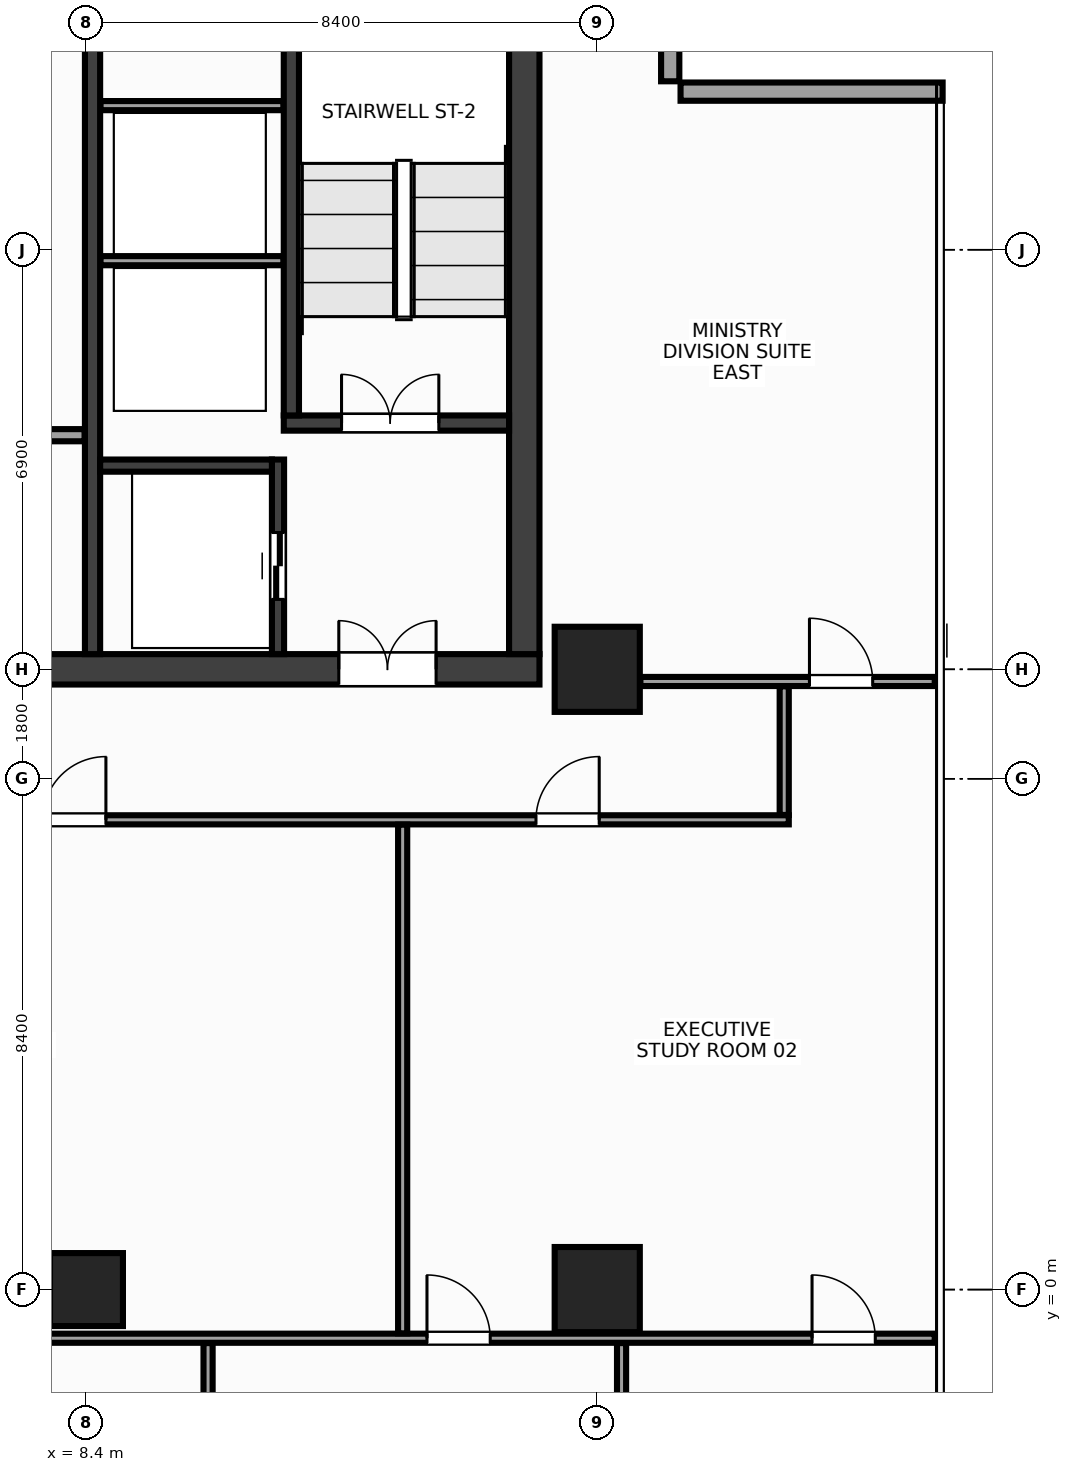
"""IFC4 building model, lengths in metres.
Left out: names, types, materials, properties, quantities, classifications, styles, units other than length and angle.
Written with IfcOpenShell. Run it as: python <this file> out.ifc"""

import sys

from ifc_helpers import new_model, si_unit, direction, frame, frame_2d, origin, origin_2d, place, context, subcontext, project, spatial, rectangle, extrude, source, transform, mapped, element, fill, save


model = new_model("IFC4")
c1 = context("Model", 3, precision=1e-05, world=origin(), true_north=direction((0.0, 1.0)))
c2 = subcontext(c1, "Body", "Model", "MODEL_VIEW")
j1 = project(units=[si_unit("LENGTHUNIT", "METRE"), si_unit("PLANEANGLEUNIT", "RADIAN")], contexts=[c1])
p1 = place(None, origin())
s1 = spatial("IfcSite", under=j1, at=p1, CompositionType="ELEMENT")
p2 = place(p1, origin())
s2 = spatial("IfcBuilding", under=s1, at=p2, CompositionType="ELEMENT")
p3 = place(p2, frame((0.0, 0.0, 246.8)))
s3 = spatial("IfcBuildingStorey", under=s2, at=p3, CompositionType="ELEMENT", Elevation=246.8)
m1 = source(origin(), c2, "Body", "SweptSolid", [
    extrude(rectangle(XDim=31.7, YDim=0.5, at=frame_2d((15.85, 0.0))), origin(), (0.0, 0.0, 1.0), 3.6),
])
p4 = place(p3, frame((-15.85, 10.2, 0.0), z_axis=(0.0, 0.0, 1.0), x_axis=(1.0, 0.0, 0.0)))
e1 = element("IfcWall", 1, at=p4, inside=s3, PredefinedType="SHEAR", context=c2, shape_type="MappedRepresentation", body=[
    mapped(m1, transform((0.0, 0.0, 0.0), x_axis=(1.0, 0.0, 0.0), y_axis=(0.0, 1.0, 0.0), z_axis=(0.0, 0.0, 1.0), scale=1.0)),
])
p5 = place(p4, frame((1.7, 0.0, 0.0)))
e2 = element("IfcOpeningElement", 2, at=p5, cuts=e1, PredefinedType="OPENING", context=c2, shape_type="SweptSolid", body=[
    extrude(rectangle(XDim=1.6, YDim=2.15, at=frame_2d((0.8, 1.075))), frame((0.0, 0.262, 0.0), z_axis=(0.0, -1.0, 0.0), x_axis=(1.0, 0.0, 0.0)), (0.0, 0.0, 1.0), 0.524),
])
p6 = place(p4, frame((28.4, 0.0, 0.0)))
e3 = element("IfcOpeningElement", 3, at=p6, cuts=e1, PredefinedType="OPENING", context=c2, shape_type="SweptSolid", body=[
    extrude(rectangle(XDim=1.6, YDim=2.15, at=frame_2d((0.8, 1.075))), frame((0.0, 0.262, 0.0), z_axis=(0.0, -1.0, 0.0), x_axis=(1.0, 0.0, 0.0)), (0.0, 0.0, 1.0), 0.524),
])
p7 = place(p4, frame((15.1, 0.0, 0.0)))
e4 = element("IfcOpeningElement", 4, at=p7, cuts=e1, PredefinedType="OPENING", context=c2, shape_type="SweptSolid", body=[
    extrude(rectangle(XDim=1.5, YDim=2.2, at=frame_2d((0.75, 1.1))), frame((0.0, 0.262, 0.0), z_axis=(0.0, -1.0, 0.0), x_axis=(1.0, 0.0, 0.0)), (0.0, 0.0, 1.0), 0.524),
])
m2 = source(origin(), c2, "Body", "SweptSolid", [
    extrude(rectangle(XDim=13.1, YDim=0.5, at=frame_2d((6.55, 0.0))), origin(), (0.0, 0.0, 1.0), 3.6),
])
p8 = place(p3, frame((15.6, 10.45, 0.0), z_axis=(0.0, 0.0, 1.0), x_axis=(0.0, 1.0, 0.0)))
e5 = element("IfcWall", 5, at=p8, inside=s3, PredefinedType="SHEAR", context=c2, shape_type="MappedRepresentation", body=[
    mapped(m2, transform((0.0, 0.0, 0.0), x_axis=(1.0, 0.0, 0.0), y_axis=(0.0, 1.0, 0.0), z_axis=(0.0, 0.0, 1.0), scale=1.0)),
])
m3 = source(origin(), c2, "Body", "SweptSolid", [
    extrude(rectangle(XDim=13.1, YDim=0.25, at=frame_2d((6.55, 0.0))), origin(), (0.0, 0.0, 1.0), 3.6),
])
p9 = place(p3, frame((8.5, 10.45, 0.0), z_axis=(0.0, 0.0, 1.0), x_axis=(0.0, 1.0, 0.0)))
e6 = element("IfcWall", 6, at=p9, inside=s3, PredefinedType="SHEAR", context=c2, shape_type="MappedRepresentation", body=[
    mapped(m3, transform((0.0, 0.0, 0.0), x_axis=(1.0, 0.0, 0.0), y_axis=(0.0, 1.0, 0.0), z_axis=(0.0, 0.0, 1.0), scale=1.0)),
])
p10 = place(p9, frame((10.0, 0.0, 0.0)))
e7 = element("IfcOpeningElement", 7, at=p10, cuts=e6, PredefinedType="OPENING", context=c2, shape_type="SweptSolid", body=[
    extrude(rectangle(XDim=0.95, YDim=2.15, at=frame_2d((0.475, 1.075))), frame((0.0, 0.137, 0.0), z_axis=(0.0, -1.0, 0.0), x_axis=(1.0, 0.0, 0.0)), (0.0, 0.0, 1.0), 0.274),
])
m4 = source(origin(), c2, "Body", "SweptSolid", [
    extrude(rectangle(XDim=3.705, YDim=0.25, at=frame_2d((1.853, 0.0))), origin(), (0.0, 0.0, 1.0), 3.6),
])
p11 = place(p3, frame((11.645, 14.25, 0.0), z_axis=(0.0, 0.0, 1.0), x_axis=(1.0, 0.0, 0.0)))
e8 = element("IfcWall", 8, at=p11, inside=s3, PredefinedType="SHEAR", context=c2, shape_type="MappedRepresentation", body=[
    mapped(m4, transform((0.0, 0.0, 0.0), x_axis=(1.0, 0.0, 0.0), y_axis=(0.0, 1.0, 0.0), z_axis=(0.0, 0.0, 1.0), scale=1.0)),
])
p12 = place(p11, frame((0.95, 0.0, 0.0)))
e9 = element("IfcOpeningElement", 9, at=p12, cuts=e8, PredefinedType="OPENING", context=c2, shape_type="SweptSolid", body=[
    extrude(rectangle(XDim=1.6, YDim=2.15, at=frame_2d((0.8, 1.075))), frame((0.0, 0.137, 0.0), z_axis=(0.0, -1.0, 0.0), x_axis=(1.0, 0.0, 0.0)), (0.0, 0.0, 1.0), 0.274),
])
m5 = source(origin(), c2, "Body", "SweptSolid", [
    extrude(rectangle(XDim=9.175, YDim=0.25, at=frame_2d((4.587, 0.0))), origin(), (0.0, 0.0, 1.0), 3.6),
])
p13 = place(p3, frame((11.77, 14.375, 0.0), z_axis=(0.0, 0.0, 1.0), x_axis=(0.0, 1.0, 0.0)))
e10 = element("IfcWall", 10, at=p13, inside=s3, PredefinedType="SHEAR", context=c2, shape_type="MappedRepresentation", body=[
    mapped(m5, transform((0.0, 0.0, 0.0), x_axis=(1.0, 0.0, 0.0), y_axis=(0.0, 1.0, 0.0), z_axis=(0.0, 0.0, 1.0), scale=1.0)),
])
m6 = source(origin(), c2, "Body", "SweptSolid", [
    extrude(rectangle(XDim=3.2, YDim=0.2, at=frame_2d((1.6, 0.0))), origin(), (0.0, 0.0, 1.0), 3.6),
])
p14 = place(p3, frame((11.55, 10.45, 0.0), z_axis=(0.0, 0.0, 1.0), x_axis=(0.0, 1.0, 0.0)))
e11 = element("IfcWall", 11, at=p14, inside=s3, PredefinedType="SHEAR", context=c2, shape_type="MappedRepresentation", body=[
    mapped(m6, transform((0.0, 0.0, 0.0), x_axis=(1.0, 0.0, 0.0), y_axis=(0.0, 1.0, 0.0), z_axis=(0.0, 0.0, 1.0), scale=1.0)),
])
p15 = place(p14, frame((0.9, 0.0, 0.0)))
e12 = element("IfcOpeningElement", 12, at=p15, cuts=e11, PredefinedType="OPENING", context=c2, shape_type="SweptSolid", body=[
    extrude(rectangle(XDim=1.1, YDim=2.15, at=frame_2d((0.55, 1.075))), frame((0.0, 0.112, 0.0), z_axis=(0.0, -1.0, 0.0), x_axis=(1.0, 0.0, 0.0)), (0.0, 0.0, 1.0), 0.224),
])
m7 = source(origin(), c2, "Body", "SweptSolid", [
    extrude(rectangle(XDim=2.825, YDim=0.2, at=frame_2d((1.413, 0.0))), origin(), (0.0, 0.0, 1.0), 3.6),
])
p16 = place(p3, frame((8.625, 13.55, 0.0), z_axis=(0.0, 0.0, 1.0), x_axis=(1.0, 0.0, 0.0)))
e13 = element("IfcWall", 13, at=p16, inside=s3, PredefinedType="SHEAR", context=c2, shape_type="MappedRepresentation", body=[
    mapped(m7, transform((0.0, 0.0, 0.0), x_axis=(1.0, 0.0, 0.0), y_axis=(0.0, 1.0, 0.0), z_axis=(0.0, 0.0, 1.0), scale=1.0)),
])
m8 = source(origin(), c2, "Body", "SweptSolid", [
    extrude(rectangle(XDim=1.4, YDim=1.4, at=origin_2d()), origin(), (0.0, 0.0, 1.0), 3.6),
])
for number, where, z_axis, x_axis in (
    (14, (16.8, 0.0, 0.0), (0.0, 0.0, 1.0), (1.0, 0.0, 0.0)),
    (15, (16.8, 10.2, 0.0), (0.0, 0.0, 1.0), (1.0, 0.0, 0.0)),
):
    element("IfcColumn", number, at=place(p3, frame(where, z_axis=z_axis, x_axis=x_axis)), inside=s3, PredefinedType="COLUMN", context=c2, shape_type="MappedRepresentation", body=[
        mapped(m8, transform((0.0, 0.0, 0.0), x_axis=(1.0, 0.0, 0.0), y_axis=(0.0, 1.0, 0.0), z_axis=(0.0, 0.0, 1.0), scale=1.0)),
    ])
m9 = source(origin(), c2, "Body", "SweptSolid", [
    extrude(rectangle(XDim=1.2, YDim=1.2, at=origin_2d()), origin(), (0.0, 0.0, 1.0), 3.6),
])
p17 = place(p3, frame((8.4, 0.0, 0.0), z_axis=(0.0, 0.0, 1.0), x_axis=(1.0, 0.0, 0.0)))
e16 = element("IfcColumn", 16, at=p17, inside=s3, PredefinedType="COLUMN", context=c2, shape_type="MappedRepresentation", body=[
    mapped(m9, transform((0.0, 0.0, 0.0), x_axis=(1.0, 0.0, 0.0), y_axis=(0.0, 1.0, 0.0), z_axis=(0.0, 0.0, 1.0), scale=1.0)),
])
m10 = source(origin(), c2, "Body", "SweptSolid", [
    extrude(rectangle(XDim=4.31, YDim=0.3, at=frame_2d((2.155, 0.0))), origin(), (0.0, 0.0, 1.0), 2.75),
])
p18 = place(p3, frame((22.48, 19.7, 0.0), z_axis=(0.0, 0.0, 1.0), x_axis=(-1.0, 0.0, 0.0)))
e17 = element("IfcWall", 17, at=p18, inside=s3, PredefinedType="STANDARD", context=c2, shape_type="MappedRepresentation", body=[
    mapped(m10, transform((0.0, 0.0, 0.0), x_axis=(1.0, 0.0, 0.0), y_axis=(0.0, 1.0, 0.0), z_axis=(0.0, 0.0, 1.0), scale=1.0)),
])
m11 = source(origin(), c2, "Body", "SweptSolid", [
    extrude(rectangle(XDim=4.31, YDim=0.3, at=frame_2d((2.155, 0.0))), origin(), (0.0, 0.0, 1.0), 2.75),
])
p19 = place(p3, frame((18.0, 19.87, 0.0), z_axis=(0.0, 0.0, 1.0), x_axis=(0.0, 1.0, 0.0)))
e18 = element("IfcWall", 18, at=p19, inside=s3, PredefinedType="STANDARD", context=c2, shape_type="MappedRepresentation", body=[
    mapped(m11, transform((0.0, 0.0, 0.0), x_axis=(1.0, 0.0, 0.0), y_axis=(0.0, 1.0, 0.0), z_axis=(0.0, 0.0, 1.0), scale=1.0)),
])
m12 = source(origin(), c2, "Body", "SweptSolid", [
    extrude(rectangle(XDim=3.01, YDim=0.15, at=frame_2d((1.505, 0.0))), origin(), (0.0, 0.0, 1.0), 3.37),
])
for number, where, z_axis, x_axis in (
    (19, (8.63, 16.92, 0.0), (0.0, 0.0, 1.0), (1.0, 0.0, 0.0)),
    (20, (8.63, 19.47, 0.0), (0.0, 0.0, 1.0), (1.0, 0.0, 0.0)),
):
    element("IfcWall", number, at=place(p3, frame(where, z_axis=z_axis, x_axis=x_axis)), inside=s3, PredefinedType="PARTITIONING", context=c2, shape_type="MappedRepresentation", body=[
        mapped(m12, transform((0.0, 0.0, 0.0), x_axis=(1.0, 0.0, 0.0), y_axis=(0.0, 1.0, 0.0), z_axis=(0.0, 0.0, 1.0), scale=1.0)),
    ])
m13 = source(origin(), c2, "Body", "SweptSolid", [
    extrude(rectangle(XDim=7.07, YDim=0.2, at=frame_2d((3.535, 0.0))), origin(), (0.0, 0.0, 1.0), 3.37),
])
p20 = place(p3, frame((1.3, 14.05, 0.0), z_axis=(0.0, 0.0, 1.0), x_axis=(1.0, 0.0, 0.0)))
e21 = element("IfcWall", 21, at=p20, inside=s3, PredefinedType="PARTITIONING", context=c2, shape_type="MappedRepresentation", body=[
    mapped(m13, transform((0.0, 0.0, 0.0), x_axis=(1.0, 0.0, 0.0), y_axis=(0.0, 1.0, 0.0), z_axis=(0.0, 0.0, 1.0), scale=1.0)),
])
p21 = place(p20, frame((1.16, 0.0, 0.0)))
e22 = element("IfcOpeningElement", 22, at=p21, cuts=e21, PredefinedType="OPENING", context=c2, shape_type="SweptSolid", body=[
    extrude(rectangle(XDim=0.9, YDim=2.15, at=frame_2d((0.45, 1.075))), frame((0.0, 0.112, 0.0), z_axis=(0.0, -1.0, 0.0), x_axis=(1.0, 0.0, 0.0)), (0.0, 0.0, 1.0), 0.224),
])
p22 = place(p20, frame((4.61, 0.0, 0.0)))
e23 = element("IfcOpeningElement", 23, at=p22, cuts=e21, PredefinedType="OPENING", context=c2, shape_type="SweptSolid", body=[
    extrude(rectangle(XDim=0.9, YDim=2.15, at=frame_2d((0.45, 1.075))), frame((0.0, 0.112, 0.0), z_axis=(0.0, -1.0, 0.0), x_axis=(1.0, 0.0, 0.0)), (0.0, 0.0, 1.0), 0.224),
])
m14 = source(origin(), c2, "Body", "SweptSolid", [
    extrude(rectangle(XDim=4.84, YDim=0.15, at=frame_2d((2.42, 0.0))), origin(), (0.0, 0.0, 1.0), 3.37),
])
p23 = place(p3, frame((17.51, 10.0, 0.0), z_axis=(0.0, 0.0, 1.0), x_axis=(1.0, 0.0, 0.0)))
e24 = element("IfcWall", 24, at=p23, inside=s3, PredefinedType="PARTITIONING", context=c2, shape_type="MappedRepresentation", body=[
    mapped(m14, transform((0.0, 0.0, 0.0), x_axis=(1.0, 0.0, 0.0), y_axis=(0.0, 1.0, 0.0), z_axis=(0.0, 0.0, 1.0), scale=1.0)),
])
p24 = place(p23, frame((2.78, 0.0, 0.0)))
e25 = element("IfcOpeningElement", 25, at=p24, cuts=e24, PredefinedType="OPENING", context=c2, shape_type="SweptSolid", body=[
    extrude(rectangle(XDim=1.04, YDim=2.2, at=frame_2d((0.52, 1.1))), frame((0.0, 0.087, 0.0), z_axis=(0.0, -1.0, 0.0), x_axis=(1.0, 0.0, 0.0)), (0.0, 0.0, 1.0), 0.174),
])
m15 = source(origin(), c2, "Body", "SweptSolid", [
    extrude(rectangle(XDim=21.9, YDim=0.15, at=frame_2d((10.95, 0.0))), origin(), (0.0, 0.0, 1.0), 2.755),
])
p25 = place(p3, frame((-1.95, 7.725, 0.0), z_axis=(0.0, 0.0, 1.0), x_axis=(1.0, 0.0, 0.0)))
e26 = element("IfcWall", 26, at=p25, inside=s3, PredefinedType="PARTITIONING", context=c2, shape_type="MappedRepresentation", body=[
    mapped(m15, transform((0.0, 0.0, 0.0), x_axis=(1.0, 0.0, 0.0), y_axis=(0.0, 1.0, 0.0), z_axis=(0.0, 0.0, 1.0), scale=1.0)),
])
p26 = place(p25, frame((17.742, 0.0, 0.0)))
e27 = element("IfcOpeningElement", 27, at=p26, cuts=e26, PredefinedType="OPENING", context=c2, shape_type="SweptSolid", body=[
    extrude(rectangle(XDim=1.04, YDim=2.2, at=frame_2d((0.52, 1.1))), frame((0.0, 0.087, 0.0), z_axis=(0.0, -1.0, 0.0), x_axis=(1.0, 0.0, 0.0)), (0.0, 0.0, 1.0), 0.174),
])
p27 = place(p25, frame((1.877, 0.0, 0.0)))
e28 = element("IfcOpeningElement", 28, at=p27, cuts=e26, PredefinedType="OPENING", context=c2, shape_type="SweptSolid", body=[
    extrude(rectangle(XDim=1.04, YDim=2.2, at=frame_2d((0.52, 1.1))), frame((0.0, 0.087, 0.0), z_axis=(0.0, -1.0, 0.0), x_axis=(1.0, 0.0, 0.0)), (0.0, 0.0, 1.0), 0.174),
])
p28 = place(p25, frame((9.63, 0.0, 0.0)))
e29 = element("IfcOpeningElement", 29, at=p28, cuts=e26, PredefinedType="OPENING", context=c2, shape_type="SweptSolid", body=[
    extrude(rectangle(XDim=1.04, YDim=2.2, at=frame_2d((0.52, 1.1))), frame((0.0, 0.087, 0.0), z_axis=(0.0, -1.0, 0.0), x_axis=(1.0, 0.0, 0.0)), (0.0, 0.0, 1.0), 0.174),
])
m16 = source(origin(), c2, "Body", "SweptSolid", [
    extrude(rectangle(XDim=2.115, YDim=0.15, at=frame_2d((1.058, 0.0))), origin(), (0.0, 0.0, 1.0), 3.37),
])
p29 = place(p3, frame((19.875, 7.805, 0.0), z_axis=(0.0, 0.0, 1.0), x_axis=(0.0, 1.0, 0.0)))
e30 = element("IfcWall", 30, at=p29, inside=s3, PredefinedType="PARTITIONING", context=c2, shape_type="MappedRepresentation", body=[
    mapped(m16, transform((0.0, 0.0, 0.0), x_axis=(1.0, 0.0, 0.0), y_axis=(0.0, 1.0, 0.0), z_axis=(0.0, 0.0, 1.0), scale=1.0)),
])
m17 = source(origin(), c2, "Body", "SweptSolid", [
    extrude(rectangle(XDim=24.295, YDim=0.15, at=frame_2d((12.147, 0.0))), origin(), (0.0, 0.0, 1.0), 2.755),
])
p30 = place(p3, frame((-1.945, -0.8, 0.0), z_axis=(0.0, 0.0, 1.0), x_axis=(1.0, 0.0, 0.0)))
e31 = element("IfcWall", 31, at=p30, inside=s3, PredefinedType="PARTITIONING", context=c2, shape_type="MappedRepresentation", body=[
    mapped(m17, transform((0.0, 0.0, 0.0), x_axis=(1.0, 0.0, 0.0), y_axis=(0.0, 1.0, 0.0), z_axis=(0.0, 0.0, 1.0), scale=1.0)),
])
p31 = place(p30, frame((22.278, 0.0, 0.0)))
e32 = element("IfcOpeningElement", 32, at=p31, cuts=e31, PredefinedType="OPENING", context=c2, shape_type="SweptSolid", body=[
    extrude(rectangle(XDim=1.04, YDim=2.2, at=frame_2d((0.52, 1.1))), frame((0.0, 0.087, 0.0), z_axis=(0.0, -1.0, 0.0), x_axis=(1.0, 0.0, 0.0)), (0.0, 0.0, 1.0), 0.174),
])
p32 = place(p30, frame((15.945, 0.0, 0.0)))
e33 = element("IfcOpeningElement", 33, at=p32, cuts=e31, PredefinedType="OPENING", context=c2, shape_type="SweptSolid", body=[
    extrude(rectangle(XDim=1.04, YDim=2.2, at=frame_2d((0.52, 1.1))), frame((0.0, 0.087, 0.0), z_axis=(0.0, -1.0, 0.0), x_axis=(1.0, 0.0, 0.0)), (0.0, 0.0, 1.0), 0.174),
])
m18 = source(origin(), c2, "Body", "SweptSolid", [
    extrude(rectangle(XDim=8.365, YDim=0.15, at=frame_2d((4.183, 0.0))), origin(), (0.0, 0.0, 1.0), 2.655),
])
p33 = place(p3, frame((13.6, -0.72, 0.0), z_axis=(0.0, 0.0, 1.0), x_axis=(0.0, 1.0, 0.0)))
e34 = element("IfcWall", 34, at=p33, inside=s3, PredefinedType="PARTITIONING", context=c2, shape_type="MappedRepresentation", body=[
    mapped(m18, transform((0.0, 0.0, 0.0), x_axis=(1.0, 0.0, 0.0), y_axis=(0.0, 1.0, 0.0), z_axis=(0.0, 0.0, 1.0), scale=1.0)),
])
m19 = source(origin(), c2, "Body", "SweptSolid", [
    extrude(rectangle(XDim=10.97, YDim=0.15, at=frame_2d((5.485, 0.0))), origin(), (0.0, 0.0, 1.0), 2.905),
])
p34 = place(p3, frame((10.4, -11.85, 0.0), z_axis=(0.0, 0.0, 1.0), x_axis=(0.0, 1.0, 0.0)))
e35 = element("IfcWall", 35, at=p34, inside=s3, PredefinedType="PARTITIONING", context=c2, shape_type="MappedRepresentation", body=[
    mapped(m19, transform((0.0, 0.0, 0.0), x_axis=(1.0, 0.0, 0.0), y_axis=(0.0, 1.0, 0.0), z_axis=(0.0, 0.0, 1.0), scale=1.0)),
])
m20 = source(origin(), c2, "Body", "SweptSolid", [
    extrude(rectangle(XDim=9.21, YDim=0.15, at=frame_2d((4.605, 0.0))), origin(), (0.0, 0.0, 1.0), 3.37),
])
p35 = place(p3, frame((17.2, -10.09, 0.0), z_axis=(0.0, 0.0, 1.0), x_axis=(0.0, 1.0, 0.0)))
e36 = element("IfcWall", 36, at=p35, inside=s3, PredefinedType="PARTITIONING", context=c2, shape_type="MappedRepresentation", body=[
    mapped(m20, transform((0.0, 0.0, 0.0), x_axis=(1.0, 0.0, 0.0), y_axis=(0.0, 1.0, 0.0), z_axis=(0.0, 0.0, 1.0), scale=1.0)),
])
m21 = source(origin(), c2, "Body", "SweptSolid", [
    extrude(rectangle(XDim=1.6, YDim=2.15, at=frame_2d((0.8, 1.075))), frame((0.0, 0.025, 0.0), z_axis=(0.0, -1.0, 0.0), x_axis=(1.0, 0.0, 0.0)), (0.0, 0.0, 1.0), 0.05),
])
p36 = place(p12, origin())
e37 = element("IfcDoor", 37, at=p36, inside=s3, OperationType="DOUBLE_DOOR_SINGLE_SWING", PredefinedType="DOOR", context=c2, shape_type="MappedRepresentation", body=[
    mapped(m21, transform((0.0, 0.0, 0.0), x_axis=(1.0, 0.0, 0.0), y_axis=(0.0, 1.0, 0.0), z_axis=(0.0, 0.0, 1.0), scale=1.0)),
])
fill(e9, e37)
p37 = place(p6, origin())
e38 = element("IfcDoor", 38, at=p37, inside=s3, OperationType="DOUBLE_DOOR_SINGLE_SWING", PredefinedType="DOOR", context=c2, shape_type="MappedRepresentation", body=[
    mapped(m21, transform((0.0, 0.0, 0.0), x_axis=(1.0, 0.0, 0.0), y_axis=(0.0, 1.0, 0.0), z_axis=(0.0, 0.0, 1.0), scale=1.0)),
])
fill(e3, e38)
m22 = source(origin(), c2, "Body", "SweptSolid", [
    extrude(rectangle(XDim=1.1, YDim=2.15, at=frame_2d((0.55, 1.075))), frame((0.0, 0.025, 0.0), z_axis=(0.0, -1.0, 0.0), x_axis=(1.0, 0.0, 0.0)), (0.0, 0.0, 1.0), 0.05),
])
p38 = place(p15, origin())
e39 = element("IfcDoor", 39, at=p38, inside=s3, OperationType="DOUBLE_DOOR_SLIDING", PredefinedType="DOOR", context=c2, shape_type="MappedRepresentation", body=[
    mapped(m22, transform((0.0, 0.0, 0.0), x_axis=(1.0, 0.0, 0.0), y_axis=(0.0, 1.0, 0.0), z_axis=(0.0, 0.0, 1.0), scale=1.0)),
])
fill(e12, e39)
m23 = source(origin(), c2, "Body", "SweptSolid", [
    extrude(rectangle(XDim=1.04, YDim=2.2, at=frame_2d((0.52, 1.1))), frame((0.0, 0.025, 0.0), z_axis=(0.0, -1.0, 0.0), x_axis=(1.0, 0.0, 0.0)), (0.0, 0.0, 1.0), 0.05),
])
p39 = place(p26, origin())
e40 = element("IfcDoor", 40, at=p39, inside=s3, OperationType="SINGLE_SWING_RIGHT", PredefinedType="DOOR", context=c2, shape_type="MappedRepresentation", body=[
    mapped(m23, transform((0.0, 0.0, 0.0), x_axis=(1.0, 0.0, 0.0), y_axis=(0.0, 1.0, 0.0), z_axis=(0.0, 0.0, 1.0), scale=1.0)),
])
fill(e27, e40)
p40 = place(p28, origin())
e41 = element("IfcDoor", 41, at=p40, inside=s3, OperationType="SINGLE_SWING_RIGHT", PredefinedType="DOOR", context=c2, shape_type="MappedRepresentation", body=[
    mapped(m23, transform((0.0, 0.0, 0.0), x_axis=(1.0, 0.0, 0.0), y_axis=(0.0, 1.0, 0.0), z_axis=(0.0, 0.0, 1.0), scale=1.0)),
])
fill(e29, e41)
p41 = place(p24, origin())
e42 = element("IfcDoor", 42, at=p41, inside=s3, OperationType="SINGLE_SWING_LEFT", PredefinedType="DOOR", context=c2, shape_type="MappedRepresentation", body=[
    mapped(m23, transform((0.0, 0.0, 0.0), x_axis=(1.0, 0.0, 0.0), y_axis=(0.0, 1.0, 0.0), z_axis=(0.0, 0.0, 1.0), scale=1.0)),
])
fill(e25, e42)
p42 = place(p31, origin())
e43 = element("IfcDoor", 43, at=p42, inside=s3, OperationType="SINGLE_SWING_LEFT", PredefinedType="DOOR", context=c2, shape_type="MappedRepresentation", body=[
    mapped(m23, transform((0.0, 0.0, 0.0), x_axis=(1.0, 0.0, 0.0), y_axis=(0.0, 1.0, 0.0), z_axis=(0.0, 0.0, 1.0), scale=1.0)),
])
fill(e32, e43)
p43 = place(p32, origin())
e44 = element("IfcDoor", 44, at=p43, inside=s3, OperationType="SINGLE_SWING_LEFT", PredefinedType="DOOR", context=c2, shape_type="MappedRepresentation", body=[
    mapped(m23, transform((0.0, 0.0, 0.0), x_axis=(1.0, 0.0, 0.0), y_axis=(0.0, 1.0, 0.0), z_axis=(0.0, 0.0, 1.0), scale=1.0)),
])
fill(e33, e44)
save(model, sys.argv[1])
